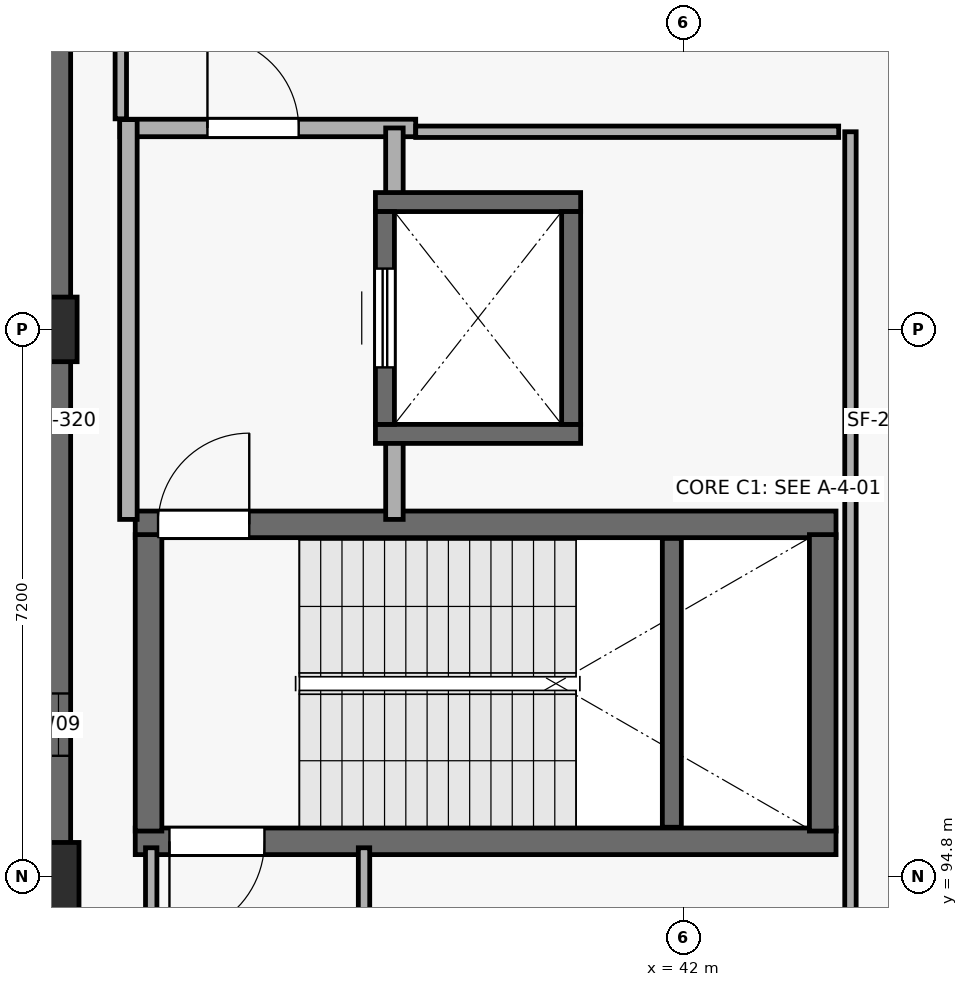
"""IFC4 building model, lengths in metres.
Left out: names, types, materials, properties, quantities, classifications, styles, units other than length and angle.
Written with IfcOpenShell. Run it as: python <this file> out.ifc"""

import sys

from ifc_helpers import new_model, si_unit, direction, frame, frame_2d, origin, origin_2d, place, context, subcontext, project, spatial, rectangle, extrude, element, fill, save


model = new_model("IFC4")
c1 = context("Model", 3, precision=1e-05, world=origin(), true_north=direction((0.0, 1.0)))
c2 = subcontext(c1, "Body", "Model", "MODEL_VIEW")
j1 = project(units=[si_unit("LENGTHUNIT", "METRE"), si_unit("PLANEANGLEUNIT", "RADIAN")], contexts=[c1])
p1 = place(None, origin())
s1 = spatial("IfcSite", under=j1, at=p1, CompositionType="ELEMENT")
p2 = place(p1, origin())
s2 = spatial("IfcBuilding", under=s1, at=p2, CompositionType="ELEMENT")
p3 = place(p2, frame((0.0, 0.0, 15.3)))
s3 = spatial("IfcBuildingStorey", under=s2, at=p3, CompositionType="ELEMENT", Elevation=15.3)
p4 = place(p3, frame((33.6, 94.8, 0.0), z_axis=(0.0, 0.0, 1.0), x_axis=(1.0, 0.0, 0.0)))
e1 = element("IfcColumn", 1, at=p4, inside=s3, PredefinedType="COLUMN", context=c2, shape_type="SweptSolid", body=[
    extrude(rectangle(XDim=0.9, YDim=0.9, at=origin_2d()), origin(), (0.0, 0.0, 1.0), 5.1),
])
p5 = place(p3, frame((33.6, 102.0, 0.0), z_axis=(0.0, 0.0, 1.0), x_axis=(1.0, 0.0, 0.0)))
e2 = element("IfcColumn", 2, at=p5, inside=s3, PredefinedType="COLUMN", context=c2, shape_type="SweptSolid", body=[
    extrude(rectangle(XDim=0.85, YDim=0.85, at=origin_2d()), origin(), (0.0, 0.0, 1.0), 5.1),
])
p6 = place(p3, frame((33.78, 91.2, 0.0), z_axis=(0.0, 0.0, 1.0), x_axis=(0.0, 1.0, 0.0)))
e3 = element("IfcWall", 3, at=p6, inside=s3, PredefinedType="SOLIDWALL", context=c2, shape_type="SweptSolid", body=[
    extrude(rectangle(XDim=19.2, YDim=0.32, at=frame_2d((9.6, 0.0))), origin(), (0.0, 0.0, 1.0), 4.82),
])
p7 = place(p6, frame((5.19, 0.0, 0.75)))
e4 = element("IfcOpeningElement", 4, at=p7, cuts=e3, PredefinedType="OPENING", context=c2, shape_type="SweptSolid", body=[
    extrude(rectangle(XDim=0.82, YDim=3.05, at=frame_2d((0.41, 1.525))), frame((0.0, 0.17, 0.0), z_axis=(0.0, -1.0, 0.0), x_axis=(1.0, 0.0, 0.0)), (0.0, 0.0, 1.0), 0.34),
])
p8 = place(p6, frame((15.2, 0.0, 0.75)))
e5 = element("IfcOpeningElement", 5, at=p8, cuts=e3, PredefinedType="OPENING", context=c2, shape_type="SweptSolid", body=[
    extrude(rectangle(XDim=0.96, YDim=1.85, at=frame_2d((0.48, 0.925))), frame((0.0, 0.17, 0.0), z_axis=(0.0, -1.0, 0.0), x_axis=(1.0, 0.0, 0.0)), (0.0, 0.0, 1.0), 0.34),
])
p9 = place(p3, frame((34.79, 95.265, 0.0), z_axis=(0.0, 0.0, 1.0), x_axis=(1.0, 0.0, 0.0)))
e6 = element("IfcWall", 6, at=p9, inside=s3, PredefinedType="SHEAR", context=c2, shape_type="SweptSolid", body=[
    extrude(rectangle(XDim=9.22, YDim=0.35, at=frame_2d((4.61, 0.0))), origin(), (0.0, 0.0, 1.0), 4.82),
])
p10 = place(p9, frame((0.45, 0.0, 0.0)))
e7 = element("IfcOpeningElement", 7, at=p10, cuts=e6, PredefinedType="OPENING", context=c2, shape_type="SweptSolid", body=[
    extrude(rectangle(XDim=1.25, YDim=2.2, at=frame_2d((0.625, 1.1))), frame((0.0, 0.185, 0.0), z_axis=(0.0, -1.0, 0.0), x_axis=(1.0, 0.0, 0.0)), (0.0, 0.0, 1.0), 0.37),
])
p11 = place(p3, frame((44.01, 99.435, 0.0), z_axis=(0.0, 0.0, 1.0), x_axis=(-1.0, 0.0, 0.0)))
e8 = element("IfcWall", 8, at=p11, inside=s3, PredefinedType="SHEAR", context=c2, shape_type="SweptSolid", body=[
    extrude(rectangle(XDim=9.22, YDim=0.35, at=frame_2d((4.61, 0.0))), origin(), (0.0, 0.0, 1.0), 4.82),
])
p12 = place(p11, frame((7.72, 0.0, 0.0)))
e9 = element("IfcOpeningElement", 9, at=p12, cuts=e8, PredefinedType="OPENING", context=c2, shape_type="SweptSolid", body=[
    extrude(rectangle(XDim=1.2, YDim=2.2, at=frame_2d((0.6, 1.1))), frame((0.0, 0.185, 0.0), z_axis=(0.0, -1.0, 0.0), x_axis=(1.0, 0.0, 0.0)), (0.0, 0.0, 1.0), 0.37),
])
for number, where, z_axis, x_axis in (
    (10, (34.965, 95.4, 0.0), (0.0, 0.0, 1.0), (0.0, 1.0, 0.0)),
    (11, (43.835, 99.3, 0.0), (0.0, 0.0, 1.0), (0.0, -1.0, 0.0)),
):
    element("IfcWall", number, at=place(p3, frame(where, z_axis=z_axis, x_axis=x_axis)), inside=s3, PredefinedType="SHEAR", context=c2, shape_type="SweptSolid", body=[
        extrude(rectangle(XDim=3.9, YDim=0.35, at=frame_2d((1.95, 0.0))), origin(), (0.0, 0.0, 1.0), 4.82),
    ])
p13 = place(p3, frame((41.85, 95.45, 0.0), z_axis=(0.0, 0.0, 1.0), x_axis=(0.0, 1.0, 0.0)))
e12 = element("IfcWall", 12, at=p13, inside=s3, PredefinedType="SHEAR", context=c2, shape_type="SweptSolid", body=[
    extrude(rectangle(XDim=3.8, YDim=0.25, at=frame_2d((1.9, 0.0))), origin(), (0.0, 0.0, 1.0), 2.37),
])
p14 = place(p3, frame((34.59, 104.65, 0.0), z_axis=(0.0, 0.0, 1.0), x_axis=(1.0, 0.0, 0.0)))
e13 = element("IfcWall", 13, at=p14, inside=s3, PredefinedType="PARTITIONING", context=c2, shape_type="SweptSolid", body=[
    extrude(rectangle(XDim=3.89, YDim=0.23, at=frame_2d((1.945, 0.0))), origin(), (0.0, 0.0, 1.0), 4.82),
])
p15 = place(p14, frame((1.15, 0.0, 0.0)))
e14 = element("IfcOpeningElement", 14, at=p15, cuts=e13, PredefinedType="OPENING", context=c2, shape_type="SweptSolid", body=[
    extrude(rectangle(XDim=1.2, YDim=2.2, at=frame_2d((0.6, 1.1))), frame((0.0, 0.125, 0.0), z_axis=(0.0, -1.0, 0.0), x_axis=(1.0, 0.0, 0.0)), (0.0, 0.0, 1.0), 0.25),
])
p16 = place(p3, frame((34.7, 99.5, 0.0), z_axis=(0.0, 0.0, 1.0), x_axis=(0.0, 1.0, 0.0)))
e15 = element("IfcWall", 15, at=p16, inside=s3, PredefinedType="PARTITIONING", context=c2, shape_type="SweptSolid", body=[
    extrude(rectangle(XDim=5.26, YDim=0.23, at=frame_2d((2.63, 0.0))), origin(), (0.0, 0.0, 1.0), 4.82),
])
p17 = place(p3, frame((38.2, 104.65, 0.0), z_axis=(0.0, 0.0, 1.0), x_axis=(0.0, -1.0, 0.0)))
e16 = element("IfcWall", 16, at=p17, inside=s3, PredefinedType="PARTITIONING", context=c2, shape_type="SweptSolid", body=[
    extrude(rectangle(XDim=1.1, YDim=0.23, at=frame_2d((0.55, 0.0))), origin(), (0.0, 0.0, 1.0), 4.82),
])
p18 = place(p3, frame((38.2, 100.75, 0.0), z_axis=(0.0, 0.0, 1.0), x_axis=(0.0, -1.0, 0.0)))
e17 = element("IfcWall", 17, at=p18, inside=s3, PredefinedType="PARTITIONING", context=c2, shape_type="SweptSolid", body=[
    extrude(rectangle(XDim=1.25, YDim=0.23, at=frame_2d((0.625, 0.0))), origin(), (0.0, 0.0, 1.0), 4.82),
])
for number, where, z_axis, x_axis in (
    (18, (37.95, 100.625, 0.0), (0.0, 0.0, 1.0), (1.0, 0.0, 0.0)),
    (19, (40.65, 103.675, 0.0), (0.0, 0.0, 1.0), (-1.0, 0.0, 0.0)),
):
    element("IfcWall", number, at=place(p3, frame(where, z_axis=z_axis, x_axis=x_axis)), inside=s3, PredefinedType="SHEAR", context=c2, shape_type="SweptSolid", body=[
        extrude(rectangle(XDim=2.7, YDim=0.25, at=frame_2d((1.35, 0.0))), origin(), (0.0, 0.0, 1.0), 4.82),
    ])
p19 = place(p3, frame((38.075, 100.75, 0.0), z_axis=(0.0, 0.0, 1.0), x_axis=(0.0, 1.0, 0.0)))
e20 = element("IfcWall", 20, at=p19, inside=s3, PredefinedType="SHEAR", context=c2, shape_type="SweptSolid", body=[
    extrude(rectangle(XDim=2.8, YDim=0.25, at=frame_2d((1.4, 0.0))), origin(), (0.0, 0.0, 1.0), 4.82),
])
p20 = place(p19, frame((0.75, 0.0, 0.0)))
e21 = element("IfcOpeningElement", 21, at=p20, cuts=e20, PredefinedType="OPENING", context=c2, shape_type="SweptSolid", body=[
    extrude(rectangle(XDim=1.3, YDim=2.25, at=frame_2d((0.65, 1.125))), frame((0.0, 0.135, 0.0), z_axis=(0.0, -1.0, 0.0), x_axis=(1.0, 0.0, 0.0)), (0.0, 0.0, 1.0), 0.27),
])
p21 = place(p3, frame((40.525, 103.55, 0.0), z_axis=(0.0, 0.0, 1.0), x_axis=(0.0, -1.0, 0.0)))
e22 = element("IfcWall", 22, at=p21, inside=s3, PredefinedType="SHEAR", context=c2, shape_type="SweptSolid", body=[
    extrude(rectangle(XDim=2.8, YDim=0.25, at=frame_2d((1.4, 0.0))), origin(), (0.0, 0.0, 1.0), 4.82),
])
p22 = place(p3, frame((44.2, 104.6, 0.0), z_axis=(0.0, 0.0, 1.0), x_axis=(0.0, -1.0, 0.0)))
e23 = element("IfcWall", 23, at=p22, inside=s3, PredefinedType="PARTITIONING", context=c2, shape_type="SweptSolid", body=[
    extrude(rectangle(XDim=10.75, YDim=0.15, at=frame_2d((5.375, 0.0))), origin(), (0.0, 0.0, 1.0), 4.82),
])
p23 = place(p3, frame((38.48, 104.6, 0.0), z_axis=(0.0, 0.0, 1.0), x_axis=(1.0, 0.0, 0.0)))
e24 = element("IfcWall", 24, at=p23, inside=s3, PredefinedType="PARTITIONING", context=c2, shape_type="SweptSolid", body=[
    extrude(rectangle(XDim=5.565, YDim=0.15, at=frame_2d((2.782, 0.0))), origin(), (0.0, 0.0, 1.0), 4.82),
])
p24 = place(p3, frame((34.6, 106.995, 0.0), z_axis=(0.0, 0.0, 1.0), x_axis=(0.0, -1.0, 0.0)))
e25 = element("IfcWall", 25, at=p24, inside=s3, PredefinedType="PARTITIONING", context=c2, shape_type="SweptSolid", body=[
    extrude(rectangle(XDim=2.225, YDim=0.15, at=frame_2d((1.113, 0.0))), origin(), (0.0, 0.0, 1.0), 4.82),
])
p25 = place(p3, frame((37.8, 94.005, 0.0), z_axis=(0.0, 0.0, 1.0), x_axis=(0.0, 1.0, 0.0)))
e26 = element("IfcWall", 26, at=p25, inside=s3, PredefinedType="PARTITIONING", context=c2, shape_type="SweptSolid", body=[
    extrude(rectangle(XDim=1.175, YDim=0.15, at=frame_2d((0.587, 0.0))), origin(), (0.0, 0.0, 1.0), 4.82),
])
p26 = place(p3, frame((35.0, 95.18, 0.0), z_axis=(0.0, 0.0, 1.0), x_axis=(0.0, -1.0, 0.0)))
e27 = element("IfcWall", 27, at=p26, inside=s3, PredefinedType="PARTITIONING", context=c2, shape_type="SweptSolid", body=[
    extrude(rectangle(XDim=1.33, YDim=0.15, at=frame_2d((0.665, 0.0))), origin(), (0.0, 0.0, 1.0), 4.82),
])
p27 = place(p7, origin())
e28 = element("IfcWindow", 28, at=p27, inside=s3, PartitioningType="SINGLE_PANEL", PredefinedType="WINDOW", context=c2, shape_type="SweptSolid", body=[
    extrude(rectangle(XDim=0.82, YDim=3.05, at=frame_2d((0.41, 1.525))), frame((0.0, 0.03, 0.0), z_axis=(0.0, -1.0, 0.0), x_axis=(1.0, 0.0, 0.0)), (0.0, 0.0, 1.0), 0.06),
])
fill(e4, e28)
p28 = place(p10, origin())
e29 = element("IfcDoor", 29, at=p28, inside=s3, OperationType="SINGLE_SWING_RIGHT", PredefinedType="DOOR", context=c2, shape_type="SweptSolid", body=[
    extrude(rectangle(XDim=1.25, YDim=2.2, at=frame_2d((0.625, 1.1))), frame((0.0, 0.025, 0.0), z_axis=(0.0, -1.0, 0.0), x_axis=(1.0, 0.0, 0.0)), (0.0, 0.0, 1.0), 0.05),
])
fill(e7, e29)
p29 = place(p12, origin())
e30 = element("IfcDoor", 30, at=p29, inside=s3, OperationType="SINGLE_SWING_RIGHT", PredefinedType="DOOR", context=c2, shape_type="SweptSolid", body=[
    extrude(rectangle(XDim=1.2, YDim=2.2, at=frame_2d((0.6, 1.1))), frame((0.0, 0.025, 0.0), z_axis=(0.0, -1.0, 0.0), x_axis=(1.0, 0.0, 0.0)), (0.0, 0.0, 1.0), 0.05),
])
fill(e9, e30)
p30 = place(p15, origin())
e31 = element("IfcDoor", 31, at=p30, inside=s3, OperationType="SINGLE_SWING_LEFT", PredefinedType="DOOR", context=c2, shape_type="SweptSolid", body=[
    extrude(rectangle(XDim=1.2, YDim=2.2, at=frame_2d((0.6, 1.1))), frame((0.0, 0.025, 0.0), z_axis=(0.0, -1.0, 0.0), x_axis=(1.0, 0.0, 0.0)), (0.0, 0.0, 1.0), 0.05),
])
fill(e14, e31)
p31 = place(p20, origin())
e32 = element("IfcDoor", 32, at=p31, inside=s3, OperationType="SLIDING_TO_LEFT", PredefinedType="DOOR", context=c2, shape_type="SweptSolid", body=[
    extrude(rectangle(XDim=1.3, YDim=2.25, at=frame_2d((0.65, 1.125))), frame((0.0, 0.025, 0.0), z_axis=(0.0, -1.0, 0.0), x_axis=(1.0, 0.0, 0.0)), (0.0, 0.0, 1.0), 0.05),
])
fill(e21, e32)
save(model, sys.argv[1])
